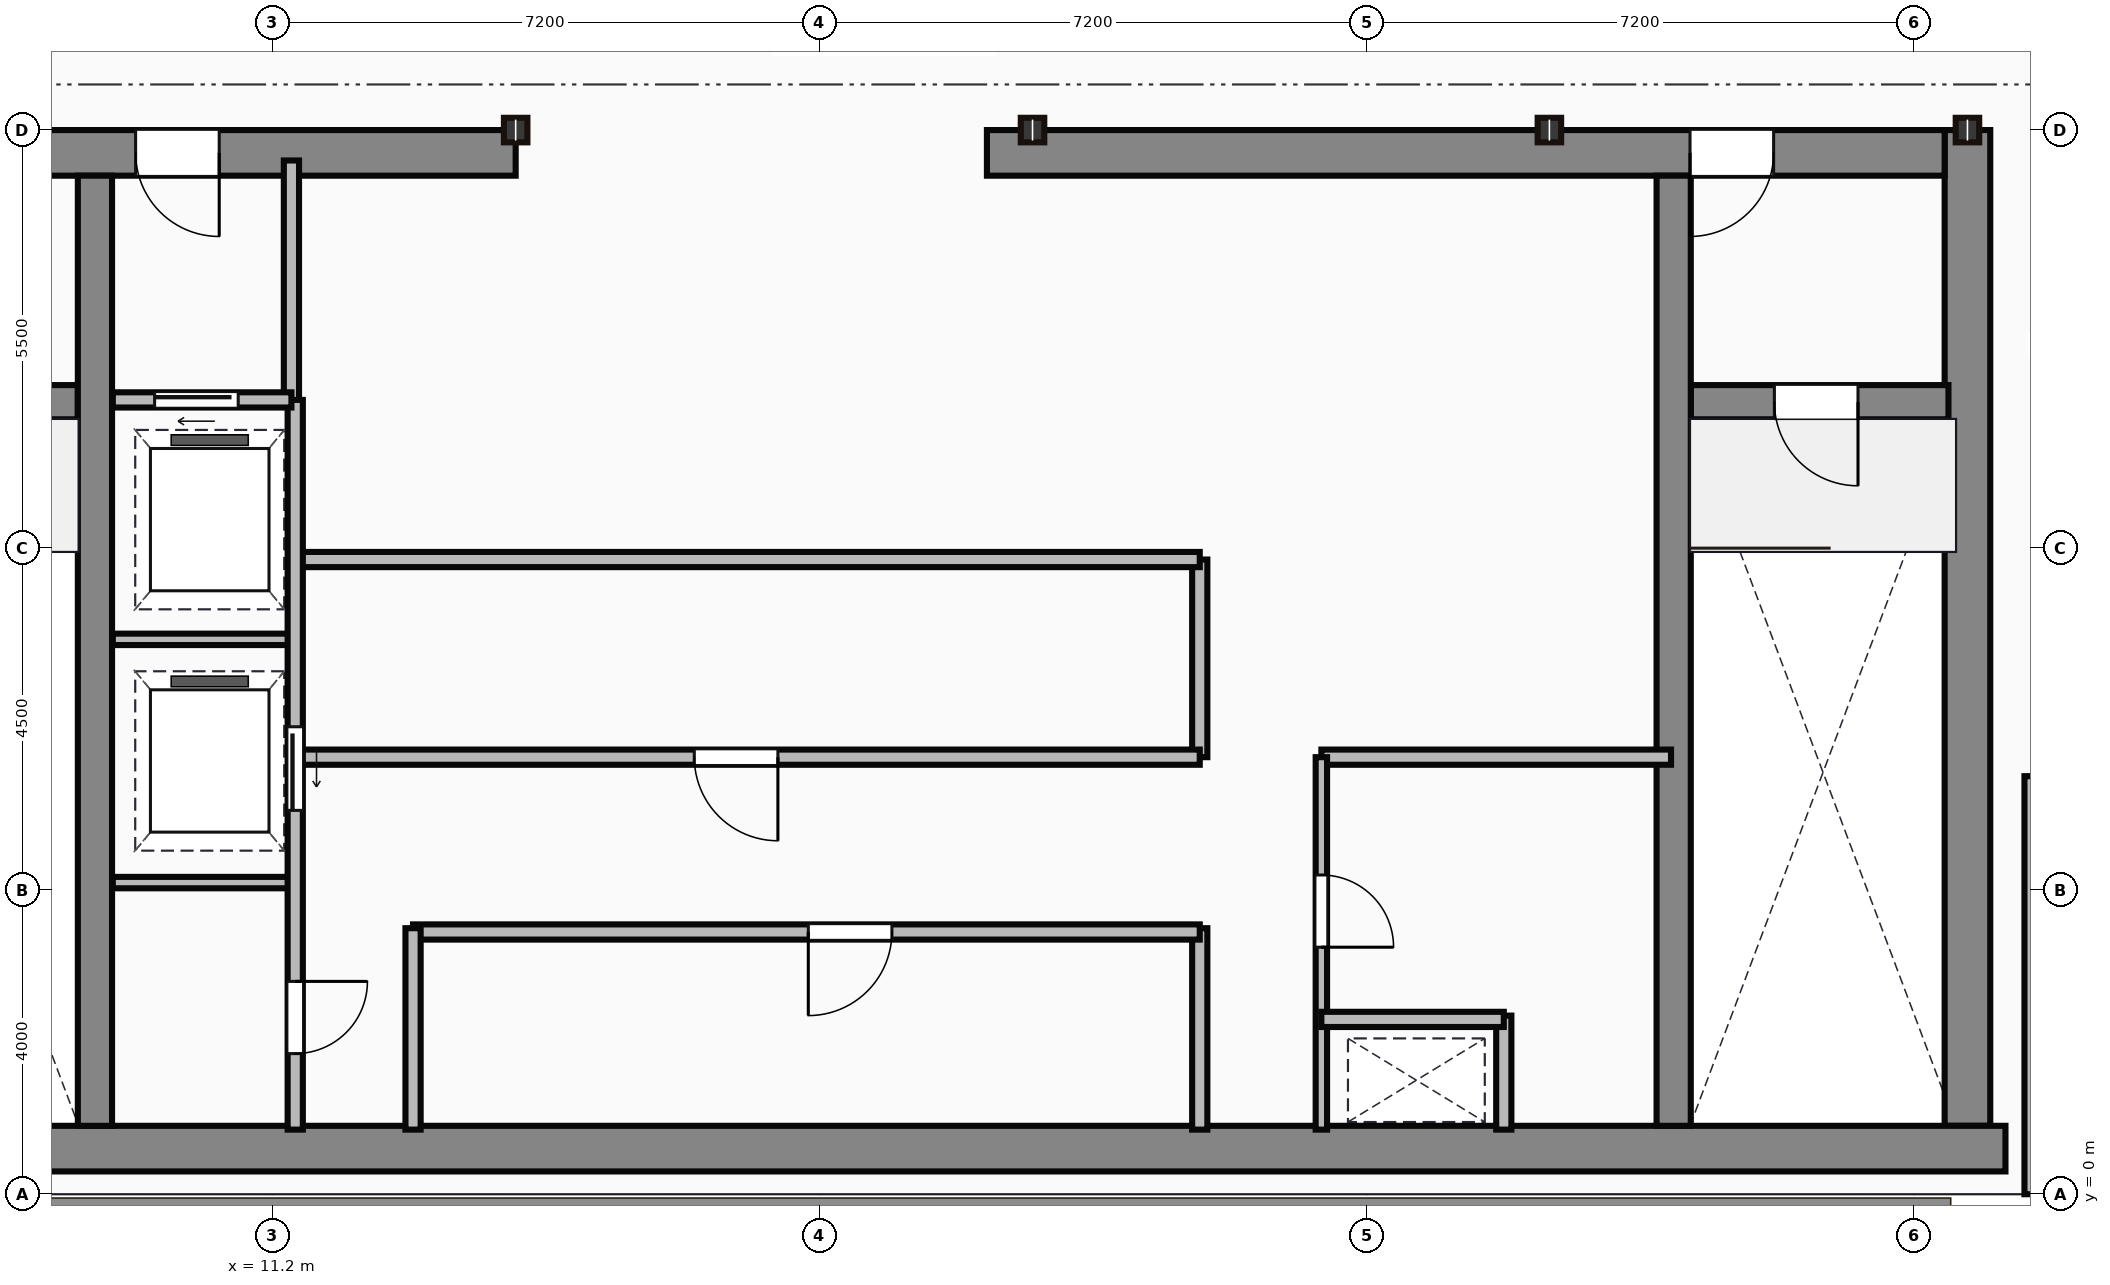
"""IFC4 building model, lengths in metres.
Left out: names, types, materials, properties, quantities, classifications, styles, units other than length and angle.
Written with IfcOpenShell. Run it as: python <this file> out.ifc"""

import sys

from ifc_helpers import new_model, si_unit, direction, frame, frame_2d, origin, origin_2d, place, context, subcontext, project, spatial, rectangle, i_section, extrude, source, transform, mapped, element, fill, save


model = new_model("IFC4")
c1 = context("Model", 3, precision=1e-05, world=origin(), true_north=direction((0.0, 1.0)))
c2 = subcontext(c1, "Body", "Model", "MODEL_VIEW")
j1 = project(units=[si_unit("LENGTHUNIT", "METRE"), si_unit("PLANEANGLEUNIT", "RADIAN")], contexts=[c1])
p1 = place(None, origin())
s1 = spatial("IfcSite", under=j1, at=p1, CompositionType="ELEMENT")
p2 = place(p1, origin())
s2 = spatial("IfcBuilding", under=s1, at=p2, CompositionType="ELEMENT")
p3 = place(p2, frame((0.0, 0.0, 311.25)))
s3 = spatial("IfcBuildingStorey", under=s2, at=p3, CompositionType="ELEMENT", Elevation=311.25)
m1 = source(origin(), c2, "Body", "SweptSolid", [
    extrude(rectangle(XDim=29.5, YDim=0.6, at=frame_2d((14.75, 0.0))), origin(), (0.0, 0.0, 1.0), 3.8),
])
p4 = place(p3, frame((4.5, 0.6, 0.0), z_axis=(0.0, 0.0, 1.0), x_axis=(1.0, 0.0, 0.0)))
e1 = element("IfcWall", 1, at=p4, inside=s3, PredefinedType="SHEAR", context=c2, shape_type="MappedRepresentation", body=[
    mapped(m1, transform((0.0, 0.0, 0.0))),
])
m2 = source(origin(), c2, "Body", "SweptSolid", [
    extrude(rectangle(XDim=13.1, YDim=0.6, at=frame_2d((6.55, 0.0))), origin(), (0.0, 0.0, 1.0), 3.8),
])
p5 = place(p3, frame((33.5, 0.9, 0.0), z_axis=(0.0, 0.0, 1.0), x_axis=(0.0, 1.0, 0.0)))
e2 = element("IfcWall", 2, at=p5, inside=s3, PredefinedType="SHEAR", context=c2, shape_type="MappedRepresentation", body=[
    mapped(m2, transform((0.0, 0.0, 0.0))),
])
m3 = source(origin(), c2, "Body", "SweptSolid", [
    extrude(rectangle(XDim=9.1, YDim=0.6, at=frame_2d((4.55, 0.0))), origin(), (0.0, 0.0, 1.0), 3.8),
])
p6 = place(p3, frame((5.3, 13.7, 0.0), z_axis=(0.0, 0.0, 1.0), x_axis=(1.0, 0.0, 0.0)))
e3 = element("IfcWall", 3, at=p6, inside=s3, PredefinedType="SHEAR", context=c2, shape_type="MappedRepresentation", body=[
    mapped(m3, transform((0.0, 0.0, 0.0))),
])
p7 = place(p6, frame((4.1, 0.0, 0.0)))
e4 = element("IfcOpeningElement", 4, at=p7, cuts=e3, PredefinedType="OPENING", context=c2, shape_type="SweptSolid", body=[
    extrude(rectangle(XDim=1.1, YDim=2.15, at=frame_2d((0.55, 1.075))), frame((0.0, 0.31, 0.0), z_axis=(0.0, -1.0, 0.0), x_axis=(1.0, 0.0, 0.0)), (0.0, 0.0, 1.0), 0.62),
])
m4 = source(origin(), c2, "Body", "SweptSolid", [
    extrude(rectangle(XDim=12.6, YDim=0.6, at=frame_2d((6.3, 0.0))), origin(), (0.0, 0.0, 1.0), 3.8),
])
p8 = place(p3, frame((20.6, 13.7, 0.0), z_axis=(0.0, 0.0, 1.0), x_axis=(1.0, 0.0, 0.0)))
e5 = element("IfcWall", 5, at=p8, inside=s3, PredefinedType="SHEAR", context=c2, shape_type="MappedRepresentation", body=[
    mapped(m4, transform((0.0, 0.0, 0.0))),
])
p9 = place(p8, frame((9.25, 0.0, 0.0)))
e6 = element("IfcOpeningElement", 6, at=p9, cuts=e5, PredefinedType="OPENING", context=c2, shape_type="SweptSolid", body=[
    extrude(rectangle(XDim=1.1, YDim=2.15, at=frame_2d((0.55, 1.075))), frame((0.0, 0.31, 0.0), z_axis=(0.0, -1.0, 0.0), x_axis=(1.0, 0.0, 0.0)), (0.0, 0.0, 1.0), 0.62),
])
m5 = source(origin(), c2, "Body", "SweptSolid", [
    extrude(rectangle(XDim=12.5, YDim=0.45, at=frame_2d((6.25, 0.0))), origin(), (0.0, 0.0, 1.0), 3.8),
])
for number, where, z_axis, x_axis in (
    (7, (8.865, 0.9, 0.0), (0.0, 0.0, 1.0), (0.0, 1.0, 0.0)),
    (8, (29.635, 0.9, 0.0), (0.0, 0.0, 1.0), (0.0, 1.0, 0.0)),
):
    element("IfcWall", number, at=place(p3, frame(where, z_axis=z_axis, x_axis=x_axis)), inside=s3, PredefinedType="SHEAR", context=c2, shape_type="MappedRepresentation", body=[
        mapped(m5, transform((0.0, 0.0, 0.0))),
    ])
m6 = source(origin(), c2, "Body", "SweptSolid", [
    extrude(rectangle(XDim=3.39, YDim=0.45, at=frame_2d((1.695, 0.0))), origin(), (0.0, 0.0, 1.0), 3.8),
])
p10 = place(p3, frame((5.25, 10.42, 0.0), z_axis=(0.0, 0.0, 1.0), x_axis=(1.0, 0.0, 0.0)))
e9 = element("IfcWall", 9, at=p10, inside=s3, PredefinedType="SHEAR", context=c2, shape_type="MappedRepresentation", body=[
    mapped(m6, transform((0.0, 0.0, 0.0))),
])
p11 = place(p10, frame((1.05, 0.0, 0.0)))
e10 = element("IfcOpeningElement", 10, at=p11, cuts=e9, PredefinedType="OPENING", context=c2, shape_type="SweptSolid", body=[
    extrude(rectangle(XDim=1.1, YDim=2.15, at=frame_2d((0.55, 1.075))), frame((0.0, 0.235, 0.0), z_axis=(0.0, -1.0, 0.0), x_axis=(1.0, 0.0, 0.0)), (0.0, 0.0, 1.0), 0.47),
])
p12 = place(p3, frame((29.86, 10.42, 0.0), z_axis=(0.0, 0.0, 1.0), x_axis=(1.0, 0.0, 0.0)))
e11 = element("IfcWall", 11, at=p12, inside=s3, PredefinedType="SHEAR", context=c2, shape_type="MappedRepresentation", body=[
    mapped(m6, transform((0.0, 0.0, 0.0))),
])
p13 = place(p12, frame((1.1, 0.0, 0.0)))
e12 = element("IfcOpeningElement", 12, at=p13, cuts=e11, PredefinedType="OPENING", context=c2, shape_type="SweptSolid", body=[
    extrude(rectangle(XDim=1.1, YDim=2.15, at=frame_2d((0.55, 1.075))), frame((0.0, 0.235, 0.0), z_axis=(0.0, -1.0, 0.0), x_axis=(1.0, 0.0, 0.0)), (0.0, 0.0, 1.0), 0.47),
])
m7 = source(origin(), c2, "Body", "SweptSolid", [
    extrude(i_section(OverallWidth=0.309, OverallDepth=0.323, WebThickness=0.014, FlangeThickness=0.023, at=origin_2d()), origin(), (0.0, 0.0, 1.0), 3.8),
])
for number, where, z_axis, x_axis in (
    (13, (14.4, 14.0, 0.0), (0.0, 0.0, 1.0), (1.0, 0.0, 0.0)),
    (14, (21.2, 14.0, 0.0), (0.0, 0.0, 1.0), (1.0, 0.0, 0.0)),
    (15, (28.0, 14.0, 0.0), (0.0, 0.0, 1.0), (1.0, 0.0, 0.0)),
    (16, (33.5, 14.0, 0.0), (0.0, 0.0, 1.0), (1.0, 0.0, 0.0)),
):
    element("IfcColumn", number, at=place(p3, frame(where, z_axis=z_axis, x_axis=x_axis)), inside=s3, PredefinedType="COLUMN", context=c2, shape_type="MappedRepresentation", body=[
        mapped(m7, transform((0.0, 0.0, 0.0))),
    ])
m8 = source(origin(), c2, "Body", "SweptSolid", [
    extrude(rectangle(XDim=5.5, YDim=0.25, at=frame_2d((2.75, 0.0))), origin(), (0.0, 0.0, 1.0), 3.5),
])
p14 = place(p3, frame((34.375, 0.0, 0.0), z_axis=(0.0, 0.0, 1.0), x_axis=(0.0, 1.0, 0.0)))
e17 = element("IfcWall", 17, at=p14, inside=s3, PredefinedType="STANDARD", context=c2, shape_type="MappedRepresentation", body=[
    mapped(m8, transform((0.0, 0.0, 0.0))),
])
m9 = source(origin(), c2, "Body", "SweptSolid", [
    extrude(rectangle(XDim=3.18, YDim=0.2, at=frame_2d((1.59, 0.0))), origin(), (0.0, 0.0, 1.0), 3.5),
])
p15 = place(p3, frame((11.45, 10.42, 0.0), z_axis=(0.0, 0.0, 1.0), x_axis=(0.0, 1.0, 0.0)))
e18 = element("IfcWall", 18, at=p15, inside=s3, PredefinedType="PARTITIONING", context=c2, shape_type="MappedRepresentation", body=[
    mapped(m9, transform((0.0, 0.0, 0.0))),
])
m10 = source(origin(), c2, "Body", "SweptSolid", [
    extrude(rectangle(XDim=2.35, YDim=0.2, at=frame_2d((1.175, 0.0))), origin(), (0.0, 0.0, 1.0), 3.5),
])
p16 = place(p3, frame((9.1, 10.45, 0.0), z_axis=(0.0, 0.0, 1.0), x_axis=(1.0, 0.0, 0.0)))
e19 = element("IfcWall", 19, at=p16, inside=s3, PredefinedType="PARTITIONING", context=c2, shape_type="MappedRepresentation", body=[
    mapped(m10, transform((0.0, 0.0, 0.0))),
])
p17 = place(p16, frame((0.55, 0.0, 0.0)))
e20 = element("IfcOpeningElement", 20, at=p17, cuts=e19, PredefinedType="OPENING", context=c2, shape_type="SweptSolid", body=[
    extrude(rectangle(XDim=1.1, YDim=2.15, at=frame_2d((0.55, 1.075))), frame((0.0, 0.11, 0.0), z_axis=(0.0, -1.0, 0.0), x_axis=(1.0, 0.0, 0.0)), (0.0, 0.0, 1.0), 0.22),
])
m11 = source(origin(), c2, "Body", "SweptSolid", [
    extrude(rectangle(XDim=9.6, YDim=0.2, at=frame_2d((4.8, 0.0))), origin(), (0.0, 0.0, 1.0), 3.5),
])
p18 = place(p3, frame((11.5, 0.85, 0.0), z_axis=(0.0, 0.0, 1.0), x_axis=(0.0, 1.0, 0.0)))
e21 = element("IfcWall", 21, at=p18, inside=s3, PredefinedType="PARTITIONING", context=c2, shape_type="MappedRepresentation", body=[
    mapped(m11, transform((0.0, 0.0, 0.0))),
])
p19 = place(p18, frame((4.2, 0.0, 0.0)))
e22 = element("IfcOpeningElement", 22, at=p19, cuts=e21, PredefinedType="OPENING", context=c2, shape_type="SweptSolid", body=[
    extrude(rectangle(XDim=1.1, YDim=2.15, at=frame_2d((0.55, 1.075))), frame((0.0, 0.11, 0.0), z_axis=(0.0, -1.0, 0.0), x_axis=(1.0, 0.0, 0.0)), (0.0, 0.0, 1.0), 0.22),
])
p20 = place(p18, frame((1.0, 0.0, 0.0)))
e23 = element("IfcOpeningElement", 23, at=p20, cuts=e21, PredefinedType="OPENING", context=c2, shape_type="SweptSolid", body=[
    extrude(rectangle(XDim=0.95, YDim=2.15, at=frame_2d((0.475, 1.075))), frame((0.0, 0.11, 0.0), z_axis=(0.0, -1.0, 0.0), x_axis=(1.0, 0.0, 0.0)), (0.0, 0.0, 1.0), 0.22),
])
m12 = source(origin(), c2, "Body", "SweptSolid", [
    extrude(rectangle(XDim=2.4, YDim=0.15, at=frame_2d((1.2, 0.0))), origin(), (0.0, 0.0, 1.0), 3.5),
])
for number, where, z_axis, x_axis in (
    (24, (9.1, 4.1, 0.0), (0.0, 0.0, 1.0), (1.0, 0.0, 0.0)),
    (25, (9.1, 7.3, 0.0), (0.0, 0.0, 1.0), (1.0, 0.0, 0.0)),
):
    element("IfcWall", number, at=place(p3, frame(where, z_axis=z_axis, x_axis=x_axis)), inside=s3, PredefinedType="PARTITIONING", context=c2, shape_type="MappedRepresentation", body=[
        mapped(m12, transform((0.0, 0.0, 0.0))),
    ])
m13 = source(origin(), c2, "Body", "SweptSolid", [
    extrude(rectangle(XDim=2.65, YDim=0.2, at=frame_2d((1.325, 0.0))), origin(), (0.0, 0.0, 1.0), 3.5),
])
p21 = place(p3, frame((13.05, 0.85, 0.0), z_axis=(0.0, 0.0, 1.0), x_axis=(0.0, 1.0, 0.0)))
e26 = element("IfcWall", 26, at=p21, inside=s3, PredefinedType="PARTITIONING", context=c2, shape_type="MappedRepresentation", body=[
    mapped(m13, transform((0.0, 0.0, 0.0))),
])
m14 = source(origin(), c2, "Body", "SweptSolid", [
    extrude(rectangle(XDim=10.35, YDim=0.2, at=frame_2d((5.175, 0.0))), origin(), (0.0, 0.0, 1.0), 3.5),
])
p22 = place(p3, frame((13.05, 3.45, 0.0), z_axis=(0.0, 0.0, 1.0), x_axis=(1.0, 0.0, 0.0)))
e27 = element("IfcWall", 27, at=p22, inside=s3, PredefinedType="PARTITIONING", context=c2, shape_type="MappedRepresentation", body=[
    mapped(m14, transform((0.0, 0.0, 0.0))),
])
p23 = place(p22, frame((5.2, 0.0, 0.0)))
e28 = element("IfcOpeningElement", 28, at=p23, cuts=e27, PredefinedType="OPENING", context=c2, shape_type="SweptSolid", body=[
    extrude(rectangle(XDim=1.1, YDim=2.15, at=frame_2d((0.55, 1.075))), frame((0.0, 0.11, 0.0), z_axis=(0.0, -1.0, 0.0), x_axis=(1.0, 0.0, 0.0)), (0.0, 0.0, 1.0), 0.22),
])
p24 = place(p3, frame((23.4, 0.85, 0.0), z_axis=(0.0, 0.0, 1.0), x_axis=(0.0, 1.0, 0.0)))
e29 = element("IfcWall", 29, at=p24, inside=s3, PredefinedType="PARTITIONING", context=c2, shape_type="MappedRepresentation", body=[
    mapped(m13, transform((0.0, 0.0, 0.0))),
])
m15 = source(origin(), c2, "Body", "SweptSolid", [
    extrude(rectangle(XDim=11.85, YDim=0.2, at=frame_2d((5.925, 0.0))), origin(), (0.0, 0.0, 1.0), 3.5),
])
p25 = place(p3, frame((11.55, 5.75, 0.0), z_axis=(0.0, 0.0, 1.0), x_axis=(1.0, 0.0, 0.0)))
e30 = element("IfcWall", 30, at=p25, inside=s3, PredefinedType="PARTITIONING", context=c2, shape_type="MappedRepresentation", body=[
    mapped(m15, transform((0.0, 0.0, 0.0))),
])
p26 = place(p25, frame((5.2, 0.0, 0.0)))
e31 = element("IfcOpeningElement", 31, at=p26, cuts=e30, PredefinedType="OPENING", context=c2, shape_type="SweptSolid", body=[
    extrude(rectangle(XDim=1.1, YDim=2.15, at=frame_2d((0.55, 1.075))), frame((0.0, 0.11, 0.0), z_axis=(0.0, -1.0, 0.0), x_axis=(1.0, 0.0, 0.0)), (0.0, 0.0, 1.0), 0.22),
])
p27 = place(p3, frame((11.55, 8.35, 0.0), z_axis=(0.0, 0.0, 1.0), x_axis=(1.0, 0.0, 0.0)))
e32 = element("IfcWall", 32, at=p27, inside=s3, PredefinedType="PARTITIONING", context=c2, shape_type="MappedRepresentation", body=[
    mapped(m15, transform((0.0, 0.0, 0.0))),
])
m16 = source(origin(), c2, "Body", "SweptSolid", [
    extrude(rectangle(XDim=2.6, YDim=0.2, at=frame_2d((1.3, 0.0))), origin(), (0.0, 0.0, 1.0), 3.5),
])
p28 = place(p3, frame((23.4, 5.75, 0.0), z_axis=(0.0, 0.0, 1.0), x_axis=(0.0, 1.0, 0.0)))
e33 = element("IfcWall", 33, at=p28, inside=s3, PredefinedType="PARTITIONING", context=c2, shape_type="MappedRepresentation", body=[
    mapped(m16, transform((0.0, 0.0, 0.0))),
])
m17 = source(origin(), c2, "Body", "SweptSolid", [
    extrude(rectangle(XDim=4.9, YDim=0.15, at=frame_2d((2.45, 0.0))), origin(), (0.0, 0.0, 1.0), 3.5),
])
p29 = place(p3, frame((25.0, 0.85, 0.0), z_axis=(0.0, 0.0, 1.0), x_axis=(0.0, 1.0, 0.0)))
e34 = element("IfcWall", 34, at=p29, inside=s3, PredefinedType="PARTITIONING", context=c2, shape_type="MappedRepresentation", body=[
    mapped(m17, transform((0.0, 0.0, 0.0))),
])
p30 = place(p29, frame((2.4, 0.0, 0.0)))
e35 = element("IfcOpeningElement", 35, at=p30, cuts=e34, PredefinedType="OPENING", context=c2, shape_type="SweptSolid", body=[
    extrude(rectangle(XDim=0.95, YDim=2.15, at=frame_2d((0.475, 1.075))), frame((0.0, 0.085, 0.0), z_axis=(0.0, -1.0, 0.0), x_axis=(1.0, 0.0, 0.0)), (0.0, 0.0, 1.0), 0.17),
])
m18 = source(origin(), c2, "Body", "SweptSolid", [
    extrude(rectangle(XDim=4.6, YDim=0.2, at=frame_2d((2.3, 0.0))), origin(), (0.0, 0.0, 1.0), 3.5),
])
p31 = place(p3, frame((25.0, 5.75, 0.0), z_axis=(0.0, 0.0, 1.0), x_axis=(1.0, 0.0, 0.0)))
e36 = element("IfcWall", 36, at=p31, inside=s3, PredefinedType="PARTITIONING", context=c2, shape_type="MappedRepresentation", body=[
    mapped(m18, transform((0.0, 0.0, 0.0))),
])
m19 = source(origin(), c2, "Body", "SweptSolid", [
    extrude(rectangle(XDim=2.4, YDim=0.2, at=frame_2d((1.2, 0.0))), origin(), (0.0, 0.0, 1.0), 3.5),
])
p32 = place(p3, frame((25.0, 2.3, 0.0), z_axis=(0.0, 0.0, 1.0), x_axis=(1.0, 0.0, 0.0)))
e37 = element("IfcWall", 37, at=p32, inside=s3, PredefinedType="PARTITIONING", context=c2, shape_type="MappedRepresentation", body=[
    mapped(m19, transform((0.0, 0.0, 0.0))),
])
m20 = source(origin(), c2, "Body", "SweptSolid", [
    extrude(rectangle(XDim=1.5, YDim=0.2, at=frame_2d((0.75, 0.0))), origin(), (0.0, 0.0, 1.0), 3.5),
])
p33 = place(p3, frame((27.4, 0.85, 0.0), z_axis=(0.0, 0.0, 1.0), x_axis=(0.0, 1.0, 0.0)))
e38 = element("IfcWall", 38, at=p33, inside=s3, PredefinedType="PARTITIONING", context=c2, shape_type="MappedRepresentation", body=[
    mapped(m20, transform((0.0, 0.0, 0.0))),
])
m21 = source(origin(), c2, "Body", "SweptSolid", [
    extrude(rectangle(XDim=1.1, YDim=2.15, at=frame_2d((0.55, 1.075))), frame((0.0, 0.025, 0.0), z_axis=(0.0, -1.0, 0.0), x_axis=(1.0, 0.0, 0.0)), (0.0, 0.0, 1.0), 0.05),
])
p34 = place(p13, frame((1.1, 0.0, 0.0), z_axis=(0.0, 0.0, 1.0), x_axis=(-1.0, 0.0, 0.0)))
e39 = element("IfcDoor", 39, at=p34, inside=s3, OperationType="SINGLE_SWING_RIGHT", PredefinedType="DOOR", context=c2, shape_type="MappedRepresentation", body=[
    mapped(m21, transform((0.0, 0.0, 0.0))),
])
fill(e12, e39)
p35 = place(p7, origin())
e40 = element("IfcDoor", 40, at=p35, inside=s3, OperationType="SINGLE_SWING_RIGHT", PredefinedType="DOOR", context=c2, shape_type="MappedRepresentation", body=[
    mapped(m21, transform((0.0, 0.0, 0.0))),
])
fill(e4, e40)
p36 = place(p9, origin())
e41 = element("IfcDoor", 41, at=p36, inside=s3, OperationType="SINGLE_SWING_LEFT", PredefinedType="DOOR", context=c2, shape_type="MappedRepresentation", body=[
    mapped(m21, transform((0.0, 0.0, 0.0))),
])
fill(e6, e41)
p37 = place(p17, origin())
e42 = element("IfcDoor", 42, at=p37, inside=s3, OperationType="SLIDING_TO_LEFT", PredefinedType="DOOR", context=c2, shape_type="MappedRepresentation", body=[
    mapped(m21, transform((0.0, 0.0, 0.0))),
])
fill(e20, e42)
p38 = place(p19, frame((1.1, 0.0, 0.0), z_axis=(0.0, 0.0, 1.0), x_axis=(-1.0, 0.0, 0.0)))
e43 = element("IfcDoor", 43, at=p38, inside=s3, OperationType="SLIDING_TO_LEFT", PredefinedType="DOOR", context=c2, shape_type="MappedRepresentation", body=[
    mapped(m21, transform((0.0, 0.0, 0.0))),
])
fill(e22, e43)
m22 = source(origin(), c2, "Body", "SweptSolid", [
    extrude(rectangle(XDim=0.95, YDim=2.15, at=frame_2d((0.475, 1.075))), frame((0.0, 0.025, 0.0), z_axis=(0.0, -1.0, 0.0), x_axis=(1.0, 0.0, 0.0)), (0.0, 0.0, 1.0), 0.05),
])
p39 = place(p20, frame((0.95, 0.0, 0.0), z_axis=(0.0, 0.0, 1.0), x_axis=(-1.0, 0.0, 0.0)))
e44 = element("IfcDoor", 44, at=p39, inside=s3, OperationType="SINGLE_SWING_RIGHT", PredefinedType="DOOR", context=c2, shape_type="MappedRepresentation", body=[
    mapped(m22, transform((0.0, 0.0, 0.0))),
])
fill(e23, e44)
p40 = place(p23, origin())
e45 = element("IfcDoor", 45, at=p40, inside=s3, OperationType="SINGLE_SWING_LEFT", PredefinedType="DOOR", context=c2, shape_type="MappedRepresentation", body=[
    mapped(m21, transform((0.0, 0.0, 0.0))),
])
fill(e28, e45)
p41 = place(p26, frame((1.1, 0.0, 0.0), z_axis=(0.0, 0.0, 1.0), x_axis=(-1.0, 0.0, 0.0)))
e46 = element("IfcDoor", 46, at=p41, inside=s3, OperationType="SINGLE_SWING_RIGHT", PredefinedType="DOOR", context=c2, shape_type="MappedRepresentation", body=[
    mapped(m21, transform((0.0, 0.0, 0.0))),
])
fill(e31, e46)
p42 = place(p30, origin())
e47 = element("IfcDoor", 47, at=p42, inside=s3, OperationType="SINGLE_SWING_LEFT", PredefinedType="DOOR", context=c2, shape_type="MappedRepresentation", body=[
    mapped(m22, transform((0.0, 0.0, 0.0))),
])
fill(e35, e47)
save(model, sys.argv[1])
